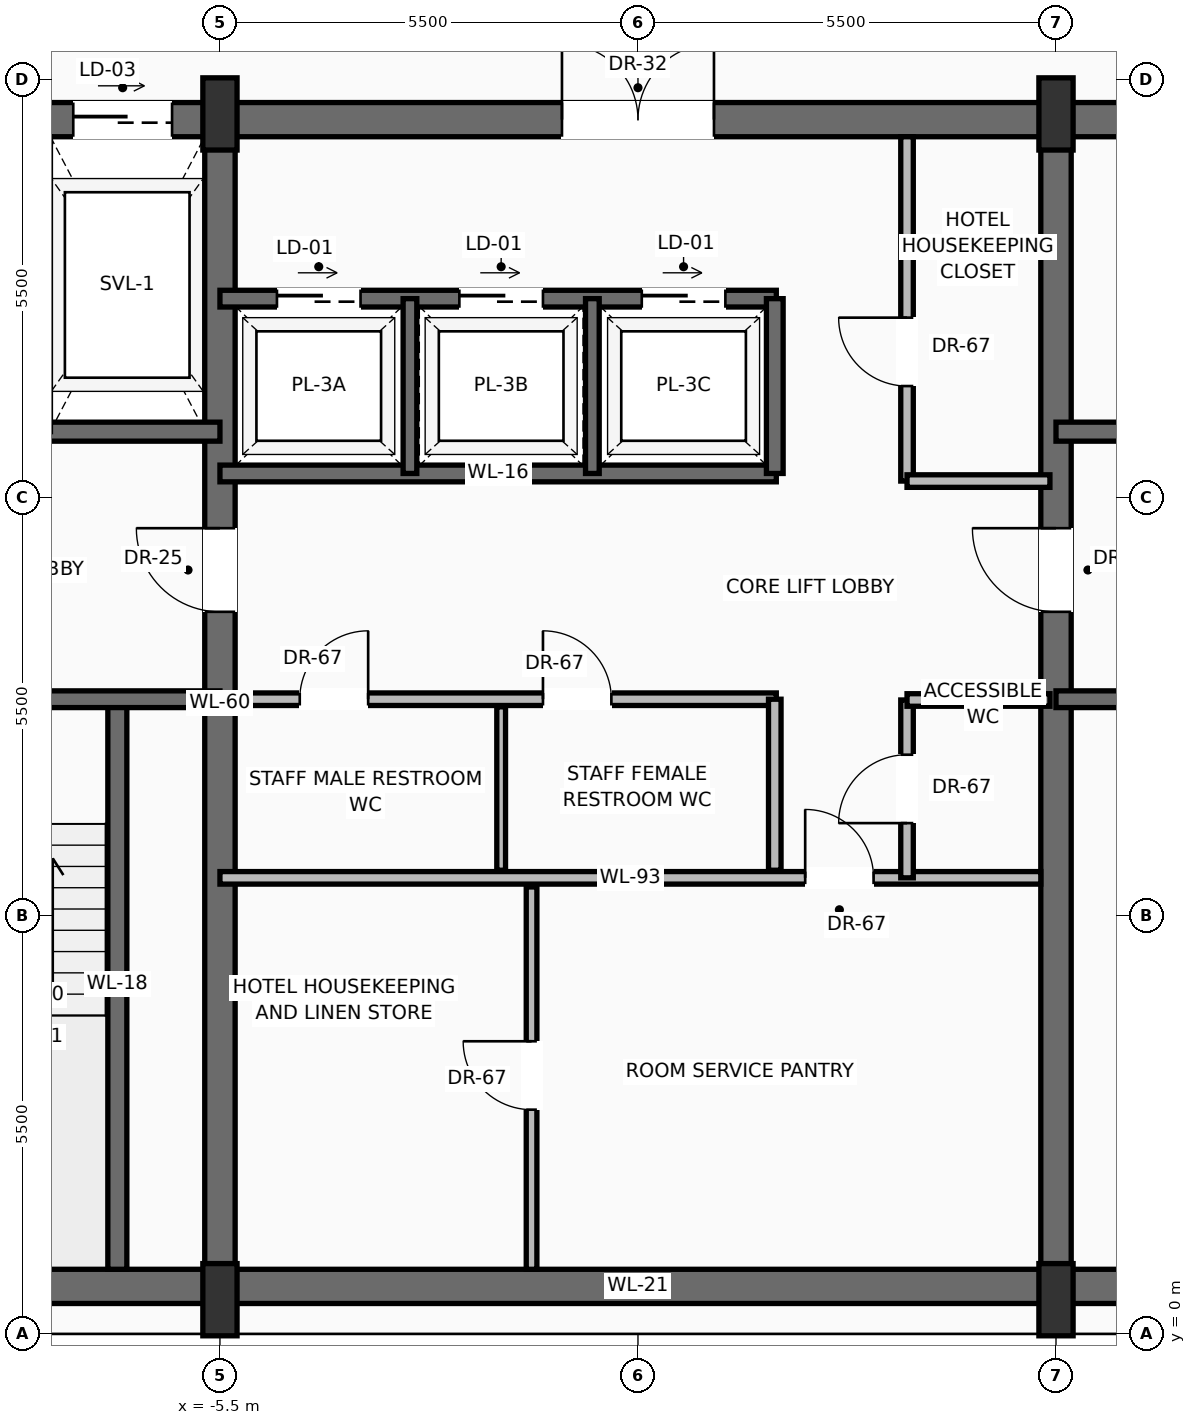
"""IFC4 building model, lengths in metres.
Left out: names, types, materials, properties, quantities, classifications, styles, units other than length and angle.
Written with IfcOpenShell. Run it as: python <this file> out.ifc"""

import sys

from ifc_helpers import new_model, si_unit, direction, frame, frame_2d, origin, origin_2d, place, context, subcontext, project, spatial, rectangle, extrude, source, transform, mapped, element, fill, save


model = new_model("IFC4")
c1 = context("Model", 3, precision=1e-05, world=origin(), true_north=direction((0.0, 1.0)))
c2 = subcontext(c1, "Body", "Model", "MODEL_VIEW")
j1 = project(units=[si_unit("LENGTHUNIT", "METRE"), si_unit("PLANEANGLEUNIT", "RADIAN")], contexts=[c1])
p1 = place(None, origin())
s1 = spatial("IfcSite", under=j1, at=p1, CompositionType="ELEMENT")
p2 = place(p1, origin())
s2 = spatial("IfcBuilding", under=s1, at=p2, CompositionType="ELEMENT")
p3 = place(p2, frame((0.0, 0.0, 283.35)))
s3 = spatial("IfcBuildingStorey", under=s2, at=p3, CompositionType="ELEMENT", Elevation=283.35)
p4 = place(p3, frame((-10.65, 0.625, 0.0), z_axis=(0.0, 0.0, 1.0), x_axis=(1.0, 0.0, 0.0)))
e1 = element("IfcWall", 1, at=p4, inside=s3, PredefinedType="SHEAR", context=c2, shape_type="SweptSolid", body=[
    extrude(rectangle(XDim=21.3, YDim=0.45, at=frame_2d((10.65, 0.0))), origin(), (0.0, 0.0, 1.0), 3.24),
])
p5 = place(p3, frame((-10.6, 15.975, 0.0), z_axis=(0.0, 0.0, 1.0), x_axis=(1.0, 0.0, 0.0)))
e2 = element("IfcWall", 2, at=p5, inside=s3, PredefinedType="SHEAR", context=c2, shape_type="SweptSolid", body=[
    extrude(rectangle(XDim=21.2, YDim=0.45, at=frame_2d((10.6, 0.0))), origin(), (0.0, 0.0, 1.0), 3.24),
])
p6 = place(p5, frame((3.17, 0.0, 0.0)))
e3 = element("IfcOpeningElement", 3, at=p6, cuts=e2, PredefinedType="OPENING", context=c2, shape_type="SweptSolid", body=[
    extrude(rectangle(XDim=1.3, YDim=2.3, at=frame_2d((0.65, 1.15))), frame((0.0, 0.235, 0.0), z_axis=(0.0, -1.0, 0.0), x_axis=(1.0, 0.0, 0.0)), (0.0, 0.0, 1.0), 0.47),
])
p7 = place(p5, frame((9.6, 0.0, 0.0)))
e4 = element("IfcOpeningElement", 4, at=p7, cuts=e2, PredefinedType="OPENING", context=c2, shape_type="SweptSolid", body=[
    extrude(rectangle(XDim=2.0, YDim=2.4, at=frame_2d((1.0, 1.2))), frame((0.0, 0.235, 0.0), z_axis=(0.0, -1.0, 0.0), x_axis=(1.0, 0.0, 0.0)), (0.0, 0.0, 1.0), 0.47),
])
p8 = place(p3, frame((-5.5, 0.625, 0.0), z_axis=(0.0, 0.0, 1.0), x_axis=(0.0, 1.0, 0.0)))
e5 = element("IfcWall", 5, at=p8, inside=s3, PredefinedType="SHEAR", context=c2, shape_type="SweptSolid", body=[
    extrude(rectangle(XDim=15.35, YDim=0.4, at=frame_2d((7.675, 0.0))), origin(), (0.0, 0.0, 1.0), 3.24),
])
p9 = place(p8, frame((8.875, 0.0, 0.0)))
e6 = element("IfcOpeningElement", 6, at=p9, cuts=e5, PredefinedType="OPENING", context=c2, shape_type="SweptSolid", body=[
    extrude(rectangle(XDim=1.1, YDim=2.2, at=frame_2d((0.55, 1.1))), frame((0.0, 0.21, 0.0), z_axis=(0.0, -1.0, 0.0), x_axis=(1.0, 0.0, 0.0)), (0.0, 0.0, 1.0), 0.42),
])
p10 = place(p3, frame((5.5, 0.625, 0.0), z_axis=(0.0, 0.0, 1.0), x_axis=(0.0, 1.0, 0.0)))
e7 = element("IfcWall", 7, at=p10, inside=s3, PredefinedType="SHEAR", context=c2, shape_type="SweptSolid", body=[
    extrude(rectangle(XDim=15.35, YDim=0.4, at=frame_2d((7.675, 0.0))), origin(), (0.0, 0.0, 1.0), 3.24),
])
p11 = place(p10, frame((8.875, 0.0, 0.0)))
e8 = element("IfcOpeningElement", 8, at=p11, cuts=e7, PredefinedType="OPENING", context=c2, shape_type="SweptSolid", body=[
    extrude(rectangle(XDim=1.1, YDim=2.2, at=frame_2d((0.55, 1.1))), frame((0.0, 0.21, 0.0), z_axis=(0.0, -1.0, 0.0), x_axis=(1.0, 0.0, 0.0)), (0.0, 0.0, 1.0), 0.42),
])
m1 = source(origin(), c2, "Body", "SweptSolid", [
    extrude(rectangle(XDim=0.45, YDim=0.95, at=origin_2d()), origin(), (0.0, 0.0, 1.0), 3.45),
])
for number, where, z_axis, x_axis in (
    (9, (-5.5, 0.45, 0.0), (0.0, 0.0, 1.0), (1.0, 0.0, 0.0)),
    (10, (5.5, 0.45, 0.0), (0.0, 0.0, 1.0), (1.0, 0.0, 0.0)),
    (11, (-5.5, 16.05, 0.0), (0.0, 0.0, 1.0), (1.0, 0.0, 0.0)),
    (12, (5.5, 16.05, 0.0), (0.0, 0.0, 1.0), (1.0, 0.0, 0.0)),
):
    element("IfcColumn", number, at=place(p3, frame(where, z_axis=z_axis, x_axis=x_axis)), inside=s3, PredefinedType="PILASTER", context=c2, shape_type="MappedRepresentation", body=[
        mapped(m1, transform((0.0, 0.0, 0.0), scale=1.0)),
    ])
p12 = place(p3, frame((-6.85, 0.85, 0.0), z_axis=(0.0, 0.0, 1.0), x_axis=(0.0, 1.0, 0.0)))
e13 = element("IfcWall", 13, at=p12, inside=s3, PredefinedType="SOLIDWALL", context=c2, shape_type="SweptSolid", body=[
    extrude(rectangle(XDim=7.5, YDim=0.25, at=frame_2d((3.75, 0.0))), origin(), (0.0, 0.0, 1.0), 3.24),
])
p13 = place(p3, frame((-5.5, 8.35, 0.0), z_axis=(0.0, 0.0, 1.0), x_axis=(-1.0, 0.0, 0.0)))
e14 = element("IfcWall", 14, at=p13, inside=s3, PredefinedType="SOLIDWALL", context=c2, shape_type="SweptSolid", body=[
    extrude(rectangle(XDim=4.65, YDim=0.22, at=frame_2d((2.325, 0.0))), origin(), (0.0, 0.0, 1.0), 3.24),
])
p14 = place(p13, frame((2.5, 0.0, 0.0)))
e15 = element("IfcOpeningElement", 15, at=p14, cuts=e14, PredefinedType="OPENING", context=c2, shape_type="SweptSolid", body=[
    extrude(rectangle(XDim=1.15, YDim=2.2, at=frame_2d((0.575, 1.1))), frame((0.0, 0.12, 0.0), z_axis=(0.0, -1.0, 0.0), x_axis=(1.0, 0.0, 0.0)), (0.0, 0.0, 1.0), 0.24),
])
p15 = place(p3, frame((-5.5, 11.87, 0.0), z_axis=(0.0, 0.0, 1.0), x_axis=(-1.0, 0.0, 0.0)))
e16 = element("IfcWall", 16, at=p15, inside=s3, PredefinedType="SOLIDWALL", context=c2, shape_type="SweptSolid", body=[
    extrude(rectangle(XDim=4.65, YDim=0.25, at=frame_2d((2.325, 0.0))), origin(), (0.0, 0.0, 1.0), 3.24),
])
p16 = place(p15, frame((2.95, 0.0, 0.0)))
e17 = element("IfcOpeningElement", 17, at=p16, cuts=e16, PredefinedType="OPENING", context=c2, shape_type="SweptSolid", body=[
    extrude(rectangle(XDim=1.2, YDim=2.25, at=frame_2d((0.6, 1.125))), frame((0.0, 0.135, 0.0), z_axis=(0.0, -1.0, 0.0), x_axis=(1.0, 0.0, 0.0)), (0.0, 0.0, 1.0), 0.27),
])
p17 = place(p3, frame((10.15, 8.35, 0.0), z_axis=(0.0, 0.0, 1.0), x_axis=(-1.0, 0.0, 0.0)))
e18 = element("IfcWall", 18, at=p17, inside=s3, PredefinedType="SOLIDWALL", context=c2, shape_type="SweptSolid", body=[
    extrude(rectangle(XDim=4.65, YDim=0.22, at=frame_2d((2.325, 0.0))), origin(), (0.0, 0.0, 1.0), 3.24),
])
p18 = place(p17, frame((1.0, 0.0, 0.0)))
e19 = element("IfcOpeningElement", 19, at=p18, cuts=e18, PredefinedType="OPENING", context=c2, shape_type="SweptSolid", body=[
    extrude(rectangle(XDim=1.15, YDim=2.2, at=frame_2d((0.575, 1.1))), frame((0.0, 0.12, 0.0), z_axis=(0.0, -1.0, 0.0), x_axis=(1.0, 0.0, 0.0)), (0.0, 0.0, 1.0), 0.24),
])
p19 = place(p3, frame((10.15, 11.87, 0.0), z_axis=(0.0, 0.0, 1.0), x_axis=(-1.0, 0.0, 0.0)))
e20 = element("IfcWall", 20, at=p19, inside=s3, PredefinedType="SOLIDWALL", context=c2, shape_type="SweptSolid", body=[
    extrude(rectangle(XDim=4.65, YDim=0.25, at=frame_2d((2.325, 0.0))), origin(), (0.0, 0.0, 1.0), 3.24),
])
p20 = place(p19, frame((0.5, 0.0, 0.0)))
e21 = element("IfcOpeningElement", 21, at=p20, cuts=e20, PredefinedType="OPENING", context=c2, shape_type="SweptSolid", body=[
    extrude(rectangle(XDim=1.2, YDim=2.25, at=frame_2d((0.6, 1.125))), frame((0.0, 0.135, 0.0), z_axis=(0.0, -1.0, 0.0), x_axis=(1.0, 0.0, 0.0)), (0.0, 0.0, 1.0), 0.27),
])
p21 = place(p3, frame((-5.5, 6.0, 0.0), z_axis=(0.0, 0.0, 1.0), x_axis=(1.0, 0.0, 0.0)))
e22 = element("IfcWall", 22, at=p21, inside=s3, PredefinedType="PARTITIONING", context=c2, shape_type="SweptSolid", body=[
    extrude(rectangle(XDim=10.8, YDim=0.165, at=frame_2d((5.4, 0.0))), origin(), (0.0, 0.0, 1.0), 3.232),
])
p22 = place(p21, frame((7.7, 0.0, 0.0)))
e23 = element("IfcOpeningElement", 23, at=p22, cuts=e22, PredefinedType="OPENING", context=c2, shape_type="SweptSolid", body=[
    extrude(rectangle(XDim=0.9, YDim=2.1, at=frame_2d((0.45, 1.05))), frame((0.0, 0.093, 0.0), z_axis=(0.0, -1.0, 0.0), x_axis=(1.0, 0.0, 0.0)), (0.0, 0.0, 1.0), 0.185),
])
p23 = place(p3, frame((-1.4, 0.85, 0.0), z_axis=(0.0, 0.0, 1.0), x_axis=(0.0, 1.0, 0.0)))
e24 = element("IfcWall", 24, at=p23, inside=s3, PredefinedType="PARTITIONING", context=c2, shape_type="SweptSolid", body=[
    extrude(rectangle(XDim=5.03, YDim=0.14, at=frame_2d((2.515, 0.0))), origin(), (0.0, 0.0, 1.0), 3.232),
])
p24 = place(p23, frame((2.1, 0.0, 0.0)))
e25 = element("IfcOpeningElement", 25, at=p24, cuts=e24, PredefinedType="OPENING", context=c2, shape_type="SweptSolid", body=[
    extrude(rectangle(XDim=0.9, YDim=2.1, at=frame_2d((0.45, 1.05))), frame((0.0, 0.08, 0.0), z_axis=(0.0, -1.0, 0.0), x_axis=(1.0, 0.0, 0.0)), (0.0, 0.0, 1.0), 0.16),
])
p25 = place(p3, frame((3.54, 6.0, 0.0), z_axis=(0.0, 0.0, 1.0), x_axis=(0.0, 1.0, 0.0)))
e26 = element("IfcWall", 26, at=p25, inside=s3, PredefinedType="PARTITIONING", context=c2, shape_type="SweptSolid", body=[
    extrude(rectangle(XDim=2.34, YDim=0.165, at=frame_2d((1.17, 0.0))), origin(), (0.0, 0.0, 1.0), 3.232),
])
p26 = place(p25, frame((0.72, 0.0, 0.0)))
e27 = element("IfcOpeningElement", 27, at=p26, cuts=e26, PredefinedType="OPENING", context=c2, shape_type="SweptSolid", body=[
    extrude(rectangle(XDim=0.9, YDim=2.1, at=frame_2d((0.45, 1.05))), frame((0.0, 0.093, 0.0), z_axis=(0.0, -1.0, 0.0), x_axis=(1.0, 0.0, 0.0)), (0.0, 0.0, 1.0), 0.185),
])
p27 = place(p3, frame((3.54, 8.34, 0.0), z_axis=(0.0, 0.0, 1.0), x_axis=(1.0, 0.0, 0.0)))
e28 = element("IfcWall", 28, at=p27, inside=s3, PredefinedType="PARTITIONING", context=c2, shape_type="SweptSolid", body=[
    extrude(rectangle(XDim=1.88, YDim=0.165, at=frame_2d((0.94, 0.0))), origin(), (0.0, 0.0, 1.0), 3.232),
])
p28 = place(p3, frame((-5.3, 8.35, 0.0), z_axis=(0.0, 0.0, 1.0), x_axis=(1.0, 0.0, 0.0)))
e29 = element("IfcWall", 29, at=p28, inside=s3, PredefinedType="PARTITIONING", context=c2, shape_type="SweptSolid", body=[
    extrude(rectangle(XDim=7.12, YDim=0.165, at=frame_2d((3.56, 0.0))), origin(), (0.0, 0.0, 1.0), 3.232),
])
p29 = place(p28, frame((0.85, 0.0, 0.0)))
e30 = element("IfcOpeningElement", 30, at=p29, cuts=e29, PredefinedType="OPENING", context=c2, shape_type="SweptSolid", body=[
    extrude(rectangle(XDim=0.9, YDim=2.1, at=frame_2d((0.45, 1.05))), frame((0.0, 0.093, 0.0), z_axis=(0.0, -1.0, 0.0), x_axis=(1.0, 0.0, 0.0)), (0.0, 0.0, 1.0), 0.185),
])
p30 = place(p28, frame((4.05, 0.0, 0.0)))
e31 = element("IfcOpeningElement", 31, at=p30, cuts=e29, PredefinedType="OPENING", context=c2, shape_type="SweptSolid", body=[
    extrude(rectangle(XDim=0.9, YDim=2.1, at=frame_2d((0.45, 1.05))), frame((0.0, 0.093, 0.0), z_axis=(0.0, -1.0, 0.0), x_axis=(1.0, 0.0, 0.0)), (0.0, 0.0, 1.0), 0.185),
])
p31 = place(p3, frame((1.8, 6.1, 0.0), z_axis=(0.0, 0.0, 1.0), x_axis=(0.0, 1.0, 0.0)))
e32 = element("IfcWall", 32, at=p31, inside=s3, PredefinedType="PARTITIONING", context=c2, shape_type="SweptSolid", body=[
    extrude(rectangle(XDim=2.25, YDim=0.165, at=frame_2d((1.125, 0.0))), origin(), (0.0, 0.0, 1.0), 3.232),
])
p32 = place(p3, frame((-1.8, 6.1, 0.0), z_axis=(0.0, 0.0, 1.0), x_axis=(0.0, 1.0, 0.0)))
e33 = element("IfcWall", 33, at=p32, inside=s3, PredefinedType="PARTITIONING", context=c2, shape_type="SweptSolid", body=[
    extrude(rectangle(XDim=2.15, YDim=0.115, at=frame_2d((1.075, 0.0))), origin(), (0.0, 0.0, 1.0), 3.232),
])
p33 = place(p3, frame((-5.5, 11.32, 0.0), z_axis=(0.0, 0.0, 1.0), x_axis=(1.0, 0.0, 0.0)))
e34 = element("IfcWall", 34, at=p33, inside=s3, PredefinedType="SOLIDWALL", context=c2, shape_type="SweptSolid", body=[
    extrude(rectangle(XDim=7.32, YDim=0.22, at=frame_2d((3.66, 0.0))), origin(), (0.0, 0.0, 1.0), 3.24),
])
p34 = place(p3, frame((-5.5, 13.62, 0.0), z_axis=(0.0, 0.0, 1.0), x_axis=(1.0, 0.0, 0.0)))
e35 = element("IfcWall", 35, at=p34, inside=s3, PredefinedType="SOLIDWALL", context=c2, shape_type="SweptSolid", body=[
    extrude(rectangle(XDim=7.32, YDim=0.22, at=frame_2d((3.66, 0.0))), origin(), (0.0, 0.0, 1.0), 3.24),
])
p35 = place(p34, frame((0.75, 0.0, 0.0)))
e36 = element("IfcOpeningElement", 36, at=p35, cuts=e35, PredefinedType="OPENING", context=c2, shape_type="SweptSolid", body=[
    extrude(rectangle(XDim=1.1, YDim=2.2, at=frame_2d((0.55, 1.1))), frame((0.0, 0.12, 0.0), z_axis=(0.0, -1.0, 0.0), x_axis=(1.0, 0.0, 0.0)), (0.0, 0.0, 1.0), 0.24),
])
p36 = place(p34, frame((3.15, 0.0, 0.0)))
e37 = element("IfcOpeningElement", 37, at=p36, cuts=e35, PredefinedType="OPENING", context=c2, shape_type="SweptSolid", body=[
    extrude(rectangle(XDim=1.1, YDim=2.2, at=frame_2d((0.55, 1.1))), frame((0.0, 0.12, 0.0), z_axis=(0.0, -1.0, 0.0), x_axis=(1.0, 0.0, 0.0)), (0.0, 0.0, 1.0), 0.24),
])
p37 = place(p34, frame((5.55, 0.0, 0.0)))
e38 = element("IfcOpeningElement", 38, at=p37, cuts=e35, PredefinedType="OPENING", context=c2, shape_type="SweptSolid", body=[
    extrude(rectangle(XDim=1.1, YDim=2.2, at=frame_2d((0.55, 1.1))), frame((0.0, 0.12, 0.0), z_axis=(0.0, -1.0, 0.0), x_axis=(1.0, 0.0, 0.0)), (0.0, 0.0, 1.0), 0.24),
])
p38 = place(p3, frame((1.8, 11.32, 0.0), z_axis=(0.0, 0.0, 1.0), x_axis=(0.0, 1.0, 0.0)))
e39 = element("IfcWall", 39, at=p38, inside=s3, PredefinedType="SOLIDWALL", context=c2, shape_type="SweptSolid", body=[
    extrude(rectangle(XDim=2.3, YDim=0.22, at=frame_2d((1.15, 0.0))), origin(), (0.0, 0.0, 1.0), 3.24),
])
for number, where, z_axis, x_axis in (
    (40, (-3.0, 11.32, 0.0), (0.0, 0.0, 1.0), (0.0, 1.0, 0.0)),
    (41, (-0.6, 11.32, 0.0), (0.0, 0.0, 1.0), (0.0, 1.0, 0.0)),
):
    element("IfcWall", number, at=place(p3, frame(where, z_axis=z_axis, x_axis=x_axis)), inside=s3, PredefinedType="SOLIDWALL", context=c2, shape_type="SweptSolid", body=[
        extrude(rectangle(XDim=2.3, YDim=0.18, at=frame_2d((1.15, 0.0))), origin(), (0.0, 0.0, 1.0), 3.24),
    ])
p39 = place(p3, frame((3.54, 11.22, 0.0), z_axis=(0.0, 0.0, 1.0), x_axis=(0.0, 1.0, 0.0)))
e42 = element("IfcWall", 42, at=p39, inside=s3, PredefinedType="PARTITIONING", context=c2, shape_type="SweptSolid", body=[
    extrude(rectangle(XDim=4.53, YDim=0.165, at=frame_2d((2.265, 0.0))), origin(), (0.0, 0.0, 1.0), 3.232),
])
p40 = place(p39, frame((1.25, 0.0, 0.0)))
e43 = element("IfcOpeningElement", 43, at=p40, cuts=e42, PredefinedType="OPENING", context=c2, shape_type="SweptSolid", body=[
    extrude(rectangle(XDim=0.9, YDim=2.1, at=frame_2d((0.45, 1.05))), frame((0.0, 0.093, 0.0), z_axis=(0.0, -1.0, 0.0), x_axis=(1.0, 0.0, 0.0)), (0.0, 0.0, 1.0), 0.185),
])
p41 = place(p3, frame((3.54, 11.22, 0.0), z_axis=(0.0, 0.0, 1.0), x_axis=(1.0, 0.0, 0.0)))
e44 = element("IfcWall", 44, at=p41, inside=s3, PredefinedType="PARTITIONING", context=c2, shape_type="SweptSolid", body=[
    extrude(rectangle(XDim=1.88, YDim=0.165, at=frame_2d((0.94, 0.0))), origin(), (0.0, 0.0, 1.0), 3.232),
])
m2 = source(origin(), c2, "Body", "SweptSolid", [
    extrude(rectangle(XDim=1.1, YDim=2.2, at=frame_2d((0.55, 1.1))), frame((0.0, 0.025, 0.0), z_axis=(0.0, -1.0, 0.0), x_axis=(1.0, 0.0, 0.0)), (0.0, 0.0, 1.0), 0.05),
])
p42 = place(p9, origin())
e45 = element("IfcDoor", 45, at=p42, inside=s3, OperationType="SINGLE_SWING_RIGHT", PredefinedType="DOOR", context=c2, shape_type="MappedRepresentation", body=[
    mapped(m2, transform((0.0, 0.0, 0.0), scale=1.0)),
])
fill(e6, e45)
m3 = source(origin(), c2, "Body", "SweptSolid", [
    extrude(rectangle(XDim=1.3, YDim=2.3, at=frame_2d((0.65, 1.15))), frame((0.0, 0.025, 0.0), z_axis=(0.0, -1.0, 0.0), x_axis=(1.0, 0.0, 0.0)), (0.0, 0.0, 1.0), 0.05),
])
p43 = place(p6, origin())
e46 = element("IfcDoor", 46, at=p43, inside=s3, OperationType="SLIDING_TO_RIGHT", PredefinedType="DOOR", context=c2, shape_type="MappedRepresentation", body=[
    mapped(m3, transform((0.0, 0.0, 0.0), scale=1.0)),
])
fill(e3, e46)
p44 = place(p11, origin())
e47 = element("IfcDoor", 47, at=p44, inside=s3, OperationType="SINGLE_SWING_RIGHT", PredefinedType="DOOR", context=c2, shape_type="MappedRepresentation", body=[
    mapped(m2, transform((0.0, 0.0, 0.0), scale=1.0)),
])
fill(e8, e47)
m4 = source(origin(), c2, "Body", "SweptSolid", [
    extrude(rectangle(XDim=2.0, YDim=2.4, at=frame_2d((1.0, 1.2))), frame((0.0, 0.025, 0.0), z_axis=(0.0, -1.0, 0.0), x_axis=(1.0, 0.0, 0.0)), (0.0, 0.0, 1.0), 0.05),
])
p45 = place(p7, origin())
e48 = element("IfcDoor", 48, at=p45, inside=s3, OperationType="DOUBLE_DOOR_SINGLE_SWING", PredefinedType="DOOR", context=c2, shape_type="MappedRepresentation", body=[
    mapped(m4, transform((0.0, 0.0, 0.0), scale=1.0)),
])
fill(e4, e48)
m5 = source(origin(), c2, "Body", "SweptSolid", [
    extrude(rectangle(XDim=0.9, YDim=2.1, at=frame_2d((0.45, 1.05))), frame((0.0, 0.025, 0.0), z_axis=(0.0, -1.0, 0.0), x_axis=(1.0, 0.0, 0.0)), (0.0, 0.0, 1.0), 0.05),
])
p46 = place(p22, origin())
e49 = element("IfcDoor", 49, at=p46, inside=s3, OperationType="SINGLE_SWING_LEFT", PredefinedType="DOOR", context=c2, shape_type="MappedRepresentation", body=[
    mapped(m5, transform((0.0, 0.0, 0.0), scale=1.0)),
])
fill(e23, e49)
p47 = place(p24, origin())
e50 = element("IfcDoor", 50, at=p47, inside=s3, OperationType="SINGLE_SWING_RIGHT", PredefinedType="DOOR", context=c2, shape_type="MappedRepresentation", body=[
    mapped(m5, transform((0.0, 0.0, 0.0), scale=1.0)),
])
fill(e25, e50)
p48 = place(p26, origin())
e51 = element("IfcDoor", 51, at=p48, inside=s3, OperationType="SINGLE_SWING_LEFT", PredefinedType="DOOR", context=c2, shape_type="MappedRepresentation", body=[
    mapped(m5, transform((0.0, 0.0, 0.0), scale=1.0)),
])
fill(e27, e51)
p49 = place(p29, origin())
e52 = element("IfcDoor", 52, at=p49, inside=s3, OperationType="SINGLE_SWING_RIGHT", PredefinedType="DOOR", context=c2, shape_type="MappedRepresentation", body=[
    mapped(m5, transform((0.0, 0.0, 0.0), scale=1.0)),
])
fill(e30, e52)
p50 = place(p30, origin())
e53 = element("IfcDoor", 53, at=p50, inside=s3, OperationType="SINGLE_SWING_LEFT", PredefinedType="DOOR", context=c2, shape_type="MappedRepresentation", body=[
    mapped(m5, transform((0.0, 0.0, 0.0), scale=1.0)),
])
fill(e31, e53)
m6 = source(origin(), c2, "Body", "SweptSolid", [
    extrude(rectangle(XDim=1.1, YDim=2.2, at=frame_2d((0.55, 1.1))), frame((0.0, 0.025, 0.0), z_axis=(0.0, -1.0, 0.0), x_axis=(1.0, 0.0, 0.0)), (0.0, 0.0, 1.0), 0.05),
])
p51 = place(p35, origin())
e54 = element("IfcDoor", 54, at=p51, inside=s3, OperationType="SLIDING_TO_RIGHT", PredefinedType="DOOR", context=c2, shape_type="MappedRepresentation", body=[
    mapped(m6, transform((0.0, 0.0, 0.0), scale=1.0)),
])
fill(e36, e54)
p52 = place(p36, origin())
e55 = element("IfcDoor", 55, at=p52, inside=s3, OperationType="SLIDING_TO_RIGHT", PredefinedType="DOOR", context=c2, shape_type="MappedRepresentation", body=[
    mapped(m6, transform((0.0, 0.0, 0.0), scale=1.0)),
])
fill(e37, e55)
p53 = place(p37, origin())
e56 = element("IfcDoor", 56, at=p53, inside=s3, OperationType="SLIDING_TO_RIGHT", PredefinedType="DOOR", context=c2, shape_type="MappedRepresentation", body=[
    mapped(m6, transform((0.0, 0.0, 0.0), scale=1.0)),
])
fill(e38, e56)
p54 = place(p40, origin())
e57 = element("IfcDoor", 57, at=p54, inside=s3, OperationType="SINGLE_SWING_RIGHT", PredefinedType="DOOR", context=c2, shape_type="MappedRepresentation", body=[
    mapped(m5, transform((0.0, 0.0, 0.0), scale=1.0)),
])
fill(e43, e57)
save(model, sys.argv[1])
